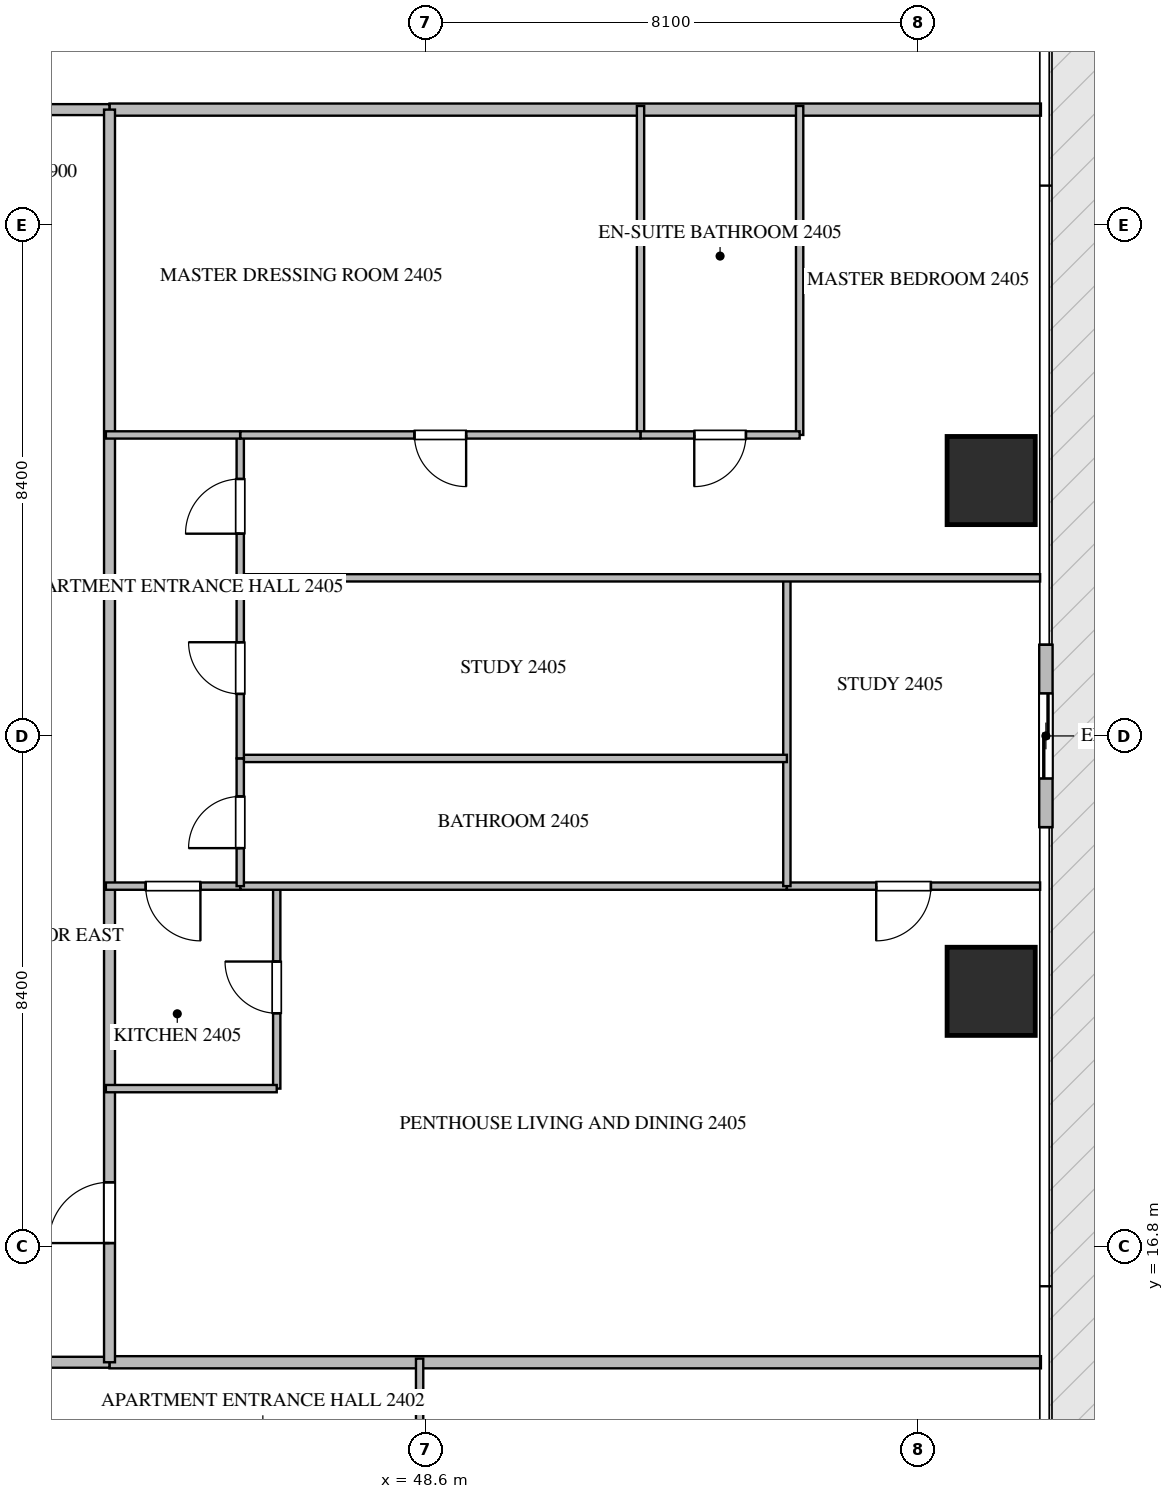
"""IFC4 building model, lengths in metres.
Left out: names, types, materials, properties, quantities, classifications, styles, units other than length and angle.
Written with IfcOpenShell. Run it as: python <this file> out.ifc"""

import sys

from ifc_helpers import new_model, si_unit, direction, frame, frame_2d, origin, origin_2d, place, context, subcontext, project, spatial, rectangle, extrude, source, transform, mapped, element, fill, save


model = new_model("IFC4")
c1 = context("Model", 3, precision=1e-05, world=origin(), true_north=direction((0.0, 1.0)))
c2 = subcontext(c1, "Body", "Model", "MODEL_VIEW")
j1 = project(units=[si_unit("LENGTHUNIT", "METRE"), si_unit("PLANEANGLEUNIT", "RADIAN")], contexts=[c1])
p1 = place(None, origin())
s1 = spatial("IfcSite", under=j1, at=p1, CompositionType="ELEMENT")
p2 = place(p1, origin())
s2 = spatial("IfcBuilding", under=s1, at=p2, CompositionType="ELEMENT")
p3 = place(p2, frame((0.0, 0.0, 97.95)))
s3 = spatial("IfcBuildingStorey", under=s2, at=p3, CompositionType="ELEMENT", Elevation=97.95)
m1 = source(origin(), c2, "Body", "SweptSolid", [
    extrude(rectangle(XDim=1.45, YDim=1.45, at=origin_2d()), origin(), (0.0, 0.0, 1.0), 3.75),
])
for number, where, z_axis, x_axis in (
    (1, (57.9, 21.0, -0.26), (0.0, 0.0, 1.0), (1.0, 0.0, 0.0)),
    (2, (57.9, 29.4, -0.26), (0.0, 0.0, 1.0), (1.0, 0.0, 0.0)),
):
    element("IfcColumn", number, at=place(p3, frame(where, z_axis=z_axis, x_axis=x_axis)), inside=s3, PredefinedType="COLUMN", context=c2, shape_type="MappedRepresentation", body=[
        mapped(m1, transform((0.0, 0.0, 0.0), scale=1.0)),
    ])
p4 = place(p3, frame((58.8, 23.7, 0.0), z_axis=(0.0, 0.0, 1.0), x_axis=(0.0, 1.0, 0.0)))
e3 = element("IfcWall", 3, at=p4, inside=s3, PredefinedType="ELEMENTEDWALL", context=c2, shape_type="SweptSolid", body=[
    extrude(rectangle(XDim=3.0, YDim=0.22, at=frame_2d((1.5, 0.0))), origin(), (0.0, 0.0, 1.0), 3.475),
])
p5 = place(p4, frame((0.8, 0.0, 0.0)))
e4 = element("IfcOpeningElement", 4, at=p5, cuts=e3, PredefinedType="OPENING", context=c2, shape_type="SweptSolid", body=[
    extrude(rectangle(XDim=1.4, YDim=2.25, at=frame_2d((0.7, 1.125))), frame((0.0, 0.12, 0.0), z_axis=(0.0, -1.0, 0.0), x_axis=(1.0, 0.0, 0.0)), (0.0, 0.0, 1.0), 0.24),
])
for number, where, z_axis, x_axis in (
    (5, (43.4, 14.9, 0.0), (0.0, 0.0, 1.0), (1.0, 0.0, 0.0)),
    (6, (43.4, 35.5, 0.0), (0.0, 0.0, 1.0), (1.0, 0.0, 0.0)),
):
    element("IfcWall", number, at=place(p3, frame(where, z_axis=z_axis, x_axis=x_axis)), inside=s3, PredefinedType="PARTITIONING", context=c2, shape_type="SweptSolid", body=[
        extrude(rectangle(XDim=15.318, YDim=0.2, at=frame_2d((7.659, 0.0))), origin(), (0.0, 0.0, 1.0), 3.49),
    ])
p6 = place(p3, frame((21.402, 14.9, 0.0), z_axis=(0.0, 0.0, 1.0), x_axis=(1.0, 0.0, 0.0)))
e7 = element("IfcWall", 7, at=p6, inside=s3, PredefinedType="PARTITIONING", context=c2, shape_type="SweptSolid", body=[
    extrude(rectangle(XDim=21.996, YDim=0.18, at=frame_2d((10.998, 0.0))), origin(), (0.0, 0.0, 1.0), 3.49),
])
p7 = place(p6, frame((7.454, 0.0, 0.0)))
e8 = element("IfcOpeningElement", 8, at=p7, cuts=e7, PredefinedType="OPENING", context=c2, shape_type="SweptSolid", body=[
    extrude(rectangle(XDim=1.0, YDim=2.15, at=frame_2d((0.5, 1.075))), frame((0.0, 0.1, 0.0), z_axis=(0.0, -1.0, 0.0), x_axis=(1.0, 0.0, 0.0)), (0.0, 0.0, 1.0), 0.2),
])
p8 = place(p6, frame((13.542, 0.0, 0.0)))
e9 = element("IfcOpeningElement", 9, at=p8, cuts=e7, PredefinedType="OPENING", context=c2, shape_type="SweptSolid", body=[
    extrude(rectangle(XDim=1.0, YDim=2.15, at=frame_2d((0.5, 1.075))), frame((0.0, 0.1, 0.0), z_axis=(0.0, -1.0, 0.0), x_axis=(1.0, 0.0, 0.0)), (0.0, 0.0, 1.0), 0.2),
])
p9 = place(p3, frame((21.402, 35.5, 0.0), z_axis=(0.0, 0.0, 1.0), x_axis=(1.0, 0.0, 0.0)))
e10 = element("IfcWall", 10, at=p9, inside=s3, PredefinedType="PARTITIONING", context=c2, shape_type="SweptSolid", body=[
    extrude(rectangle(XDim=21.996, YDim=0.18, at=frame_2d((10.998, 0.0))), origin(), (0.0, 0.0, 1.0), 3.49),
])
p10 = place(p9, frame((7.202, 0.0, 0.0)))
e11 = element("IfcOpeningElement", 11, at=p10, cuts=e10, PredefinedType="OPENING", context=c2, shape_type="SweptSolid", body=[
    extrude(rectangle(XDim=1.0, YDim=2.15, at=frame_2d((0.5, 1.075))), frame((0.0, 0.1, 0.0), z_axis=(0.0, -1.0, 0.0), x_axis=(1.0, 0.0, 0.0)), (0.0, 0.0, 1.0), 0.2),
])
p11 = place(p3, frame((43.4, 14.9, 0.0), z_axis=(0.0, 0.0, 1.0), x_axis=(0.0, 1.0, 0.0)))
e12 = element("IfcWall", 12, at=p11, inside=s3, PredefinedType="PARTITIONING", context=c2, shape_type="SweptSolid", body=[
    extrude(rectangle(XDim=20.6, YDim=0.18, at=frame_2d((10.3, 0.0))), origin(), (0.0, 0.0, 1.0), 3.49),
])
p12 = place(p11, frame((1.96, 0.0, 0.0)))
e13 = element("IfcOpeningElement", 13, at=p12, cuts=e12, PredefinedType="OPENING", context=c2, shape_type="SweptSolid", body=[
    extrude(rectangle(XDim=1.0, YDim=2.15, at=frame_2d((0.5, 1.075))), frame((0.0, 0.1, 0.0), z_axis=(0.0, -1.0, 0.0), x_axis=(1.0, 0.0, 0.0)), (0.0, 0.0, 1.0), 0.2),
])
p13 = place(p3, frame((48.5, 12.752, 0.0), z_axis=(0.0, 0.0, 1.0), x_axis=(0.0, 1.0, 0.0)))
e14 = element("IfcWall", 14, at=p13, inside=s3, PredefinedType="PARTITIONING", context=c2, shape_type="SweptSolid", body=[
    extrude(rectangle(XDim=2.208, YDim=0.12, at=frame_2d((1.104, 0.0))), origin(), (0.0, 0.0, 1.0), 3.49),
])
p14 = place(p3, frame((46.15, 19.4, 0.0), z_axis=(0.0, 0.0, 1.0), x_axis=(0.0, 1.0, 0.0)))
e15 = element("IfcWall", 15, at=p14, inside=s3, PredefinedType="PARTITIONING", context=c2, shape_type="SweptSolid", body=[
    extrude(rectangle(XDim=3.33, YDim=0.12, at=frame_2d((1.665, 0.0))), origin(), (0.0, 0.0, 1.0), 3.49),
])
p15 = place(p14, frame((1.24, 0.0, 0.0)))
e16 = element("IfcOpeningElement", 16, at=p15, cuts=e15, PredefinedType="OPENING", context=c2, shape_type="SweptSolid", body=[
    extrude(rectangle(XDim=0.85, YDim=2.1, at=frame_2d((0.425, 1.05))), frame((0.0, 0.07, 0.0), z_axis=(0.0, -1.0, 0.0), x_axis=(1.0, 0.0, 0.0)), (0.0, 0.0, 1.0), 0.14),
])
p16 = place(p3, frame((46.15, 19.4, 0.0), z_axis=(0.0, 0.0, 1.0), x_axis=(-1.0, 0.0, 0.0)))
e17 = element("IfcWall", 17, at=p16, inside=s3, PredefinedType="PARTITIONING", context=c2, shape_type="SweptSolid", body=[
    extrude(rectangle(XDim=2.81, YDim=0.12, at=frame_2d((1.405, 0.0))), origin(), (0.0, 0.0, 1.0), 3.49),
])
p17 = place(p3, frame((45.55, 22.73, 0.0), z_axis=(0.0, 0.0, 1.0), x_axis=(-1.0, 0.0, 0.0)))
e18 = element("IfcWall", 18, at=p17, inside=s3, PredefinedType="PARTITIONING", context=c2, shape_type="SweptSolid", body=[
    extrude(rectangle(XDim=2.21, YDim=0.12, at=frame_2d((1.105, 0.0))), origin(), (0.0, 0.0, 1.0), 3.49),
])
p18 = place(p17, frame((0.655, 0.0, 0.0)))
e19 = element("IfcOpeningElement", 19, at=p18, cuts=e18, PredefinedType="OPENING", context=c2, shape_type="SweptSolid", body=[
    extrude(rectangle(XDim=0.9, YDim=2.1, at=frame_2d((0.45, 1.05))), frame((0.0, 0.07, 0.0), z_axis=(0.0, -1.0, 0.0), x_axis=(1.0, 0.0, 0.0)), (0.0, 0.0, 1.0), 0.14),
])
p19 = place(p3, frame((58.705, 22.73, 0.0), z_axis=(0.0, 0.0, 1.0), x_axis=(-1.0, 0.0, 0.0)))
e20 = element("IfcWall", 20, at=p19, inside=s3, PredefinedType="PARTITIONING", context=c2, shape_type="SweptSolid", body=[
    extrude(rectangle(XDim=4.165, YDim=0.12, at=frame_2d((2.083, 0.0))), origin(), (0.0, 0.0, 1.0), 3.49),
])
p20 = place(p19, frame((1.796, 0.0, 0.0)))
e21 = element("IfcOpeningElement", 21, at=p20, cuts=e20, PredefinedType="OPENING", context=c2, shape_type="SweptSolid", body=[
    extrude(rectangle(XDim=0.9, YDim=2.1, at=frame_2d((0.45, 1.05))), frame((0.0, 0.07, 0.0), z_axis=(0.0, -1.0, 0.0), x_axis=(1.0, 0.0, 0.0)), (0.0, 0.0, 1.0), 0.14),
])
p21 = place(p3, frame((54.538, 22.73, 0.0), z_axis=(0.0, 0.0, 1.0), x_axis=(-1.0, 0.0, 0.0)))
e22 = element("IfcWall", 22, at=p21, inside=s3, PredefinedType="PARTITIONING", context=c2, shape_type="SweptSolid", body=[
    extrude(rectangle(XDim=8.986, YDim=0.12, at=frame_2d((4.493, 0.0))), origin(), (0.0, 0.0, 1.0), 3.49),
])
p22 = place(p3, frame((54.54, 22.73, 0.0), z_axis=(0.0, 0.0, 1.0), x_axis=(0.0, 1.0, 0.0)))
e23 = element("IfcWall", 23, at=p22, inside=s3, PredefinedType="PARTITIONING", context=c2, shape_type="SweptSolid", body=[
    extrude(rectangle(XDim=5.07, YDim=0.12, at=frame_2d((2.535, 0.0))), origin(), (0.0, 0.0, 1.0), 3.49),
])
p23 = place(p3, frame((58.705, 27.8, 0.0), z_axis=(0.0, 0.0, 1.0), x_axis=(-1.0, 0.0, 0.0)))
e24 = element("IfcWall", 24, at=p23, inside=s3, PredefinedType="PARTITIONING", context=c2, shape_type="SweptSolid", body=[
    extrude(rectangle(XDim=13.155, YDim=0.12, at=frame_2d((6.578, 0.0))), origin(), (0.0, 0.0, 1.0), 3.49),
])
p24 = place(p3, frame((54.54, 24.83, 0.0), z_axis=(0.0, 0.0, 1.0), x_axis=(-1.0, 0.0, 0.0)))
e25 = element("IfcWall", 25, at=p24, inside=s3, PredefinedType="PARTITIONING", context=c2, shape_type="SweptSolid", body=[
    extrude(rectangle(XDim=8.99, YDim=0.12, at=frame_2d((4.495, 0.0))), origin(), (0.0, 0.0, 1.0), 3.49),
])
p25 = place(p3, frame((45.55, 22.73, 0.0), z_axis=(0.0, 0.0, 1.0), x_axis=(0.0, 1.0, 0.0)))
e26 = element("IfcWall", 26, at=p25, inside=s3, PredefinedType="PARTITIONING", context=c2, shape_type="SweptSolid", body=[
    extrude(rectangle(XDim=2.1, YDim=0.12, at=frame_2d((1.05, 0.0))), origin(), (0.0, 0.0, 1.0), 3.49),
])
p26 = place(p25, frame((0.625, 0.0, 0.0)))
e27 = element("IfcOpeningElement", 27, at=p26, cuts=e26, PredefinedType="OPENING", context=c2, shape_type="SweptSolid", body=[
    extrude(rectangle(XDim=0.85, YDim=2.1, at=frame_2d((0.425, 1.05))), frame((0.0, 0.07, 0.0), z_axis=(0.0, -1.0, 0.0), x_axis=(1.0, 0.0, 0.0)), (0.0, 0.0, 1.0), 0.14),
])
p27 = place(p3, frame((45.55, 24.832, 0.0), z_axis=(0.0, 0.0, 1.0), x_axis=(0.0, 1.0, 0.0)))
e28 = element("IfcWall", 28, at=p27, inside=s3, PredefinedType="PARTITIONING", context=c2, shape_type="SweptSolid", body=[
    extrude(rectangle(XDim=2.968, YDim=0.12, at=frame_2d((1.484, 0.0))), origin(), (0.0, 0.0, 1.0), 3.49),
])
p28 = place(p27, frame((1.059, 0.0, 0.0)))
e29 = element("IfcOpeningElement", 29, at=p28, cuts=e28, PredefinedType="OPENING", context=c2, shape_type="SweptSolid", body=[
    extrude(rectangle(XDim=0.85, YDim=2.1, at=frame_2d((0.425, 1.05))), frame((0.0, 0.07, 0.0), z_axis=(0.0, -1.0, 0.0), x_axis=(1.0, 0.0, 0.0)), (0.0, 0.0, 1.0), 0.14),
])
p29 = place(p3, frame((45.55, 27.802, 0.0), z_axis=(0.0, 0.0, 1.0), x_axis=(0.0, 1.0, 0.0)))
e30 = element("IfcWall", 30, at=p29, inside=s3, PredefinedType="PARTITIONING", context=c2, shape_type="SweptSolid", body=[
    extrude(rectangle(XDim=2.348, YDim=0.12, at=frame_2d((1.174, 0.0))), origin(), (0.0, 0.0, 1.0), 3.49),
])
p30 = place(p29, frame((0.724, 0.0, 0.0)))
e31 = element("IfcOpeningElement", 31, at=p30, cuts=e30, PredefinedType="OPENING", context=c2, shape_type="SweptSolid", body=[
    extrude(rectangle(XDim=0.9, YDim=2.1, at=frame_2d((0.45, 1.05))), frame((0.0, 0.07, 0.0), z_axis=(0.0, -1.0, 0.0), x_axis=(1.0, 0.0, 0.0)), (0.0, 0.0, 1.0), 0.14),
])
for number, where, z_axis, x_axis in (
    (32, (54.75, 30.15, 0.0), (0.0, 0.0, 1.0), (0.0, 1.0, 0.0)),
    (33, (52.133, 30.15, 0.0), (0.0, 0.0, 1.0), (0.0, 1.0, 0.0)),
):
    element("IfcWall", number, at=place(p3, frame(where, z_axis=z_axis, x_axis=x_axis)), inside=s3, PredefinedType="PARTITIONING", context=c2, shape_type="SweptSolid", body=[
        extrude(rectangle(XDim=5.41, YDim=0.12, at=frame_2d((2.705, 0.0))), origin(), (0.0, 0.0, 1.0), 3.49),
    ])
p31 = place(p3, frame((54.75, 30.15, 0.0), z_axis=(0.0, 0.0, 1.0), x_axis=(-1.0, 0.0, 0.0)))
e34 = element("IfcWall", 34, at=p31, inside=s3, PredefinedType="PARTITIONING", context=c2, shape_type="SweptSolid", body=[
    extrude(rectangle(XDim=2.617, YDim=0.12, at=frame_2d((1.309, 0.0))), origin(), (0.0, 0.0, 1.0), 3.49),
])
p32 = place(p31, frame((0.883, 0.0, 0.0)))
e35 = element("IfcOpeningElement", 35, at=p32, cuts=e34, PredefinedType="OPENING", context=c2, shape_type="SweptSolid", body=[
    extrude(rectangle(XDim=0.85, YDim=2.1, at=frame_2d((0.425, 1.05))), frame((0.0, 0.07, 0.0), z_axis=(0.0, -1.0, 0.0), x_axis=(1.0, 0.0, 0.0)), (0.0, 0.0, 1.0), 0.14),
])
p33 = place(p3, frame((52.131, 30.15, 0.0), z_axis=(0.0, 0.0, 1.0), x_axis=(-1.0, 0.0, 0.0)))
e36 = element("IfcWall", 36, at=p33, inside=s3, PredefinedType="PARTITIONING", context=c2, shape_type="SweptSolid", body=[
    extrude(rectangle(XDim=6.581, YDim=0.12, at=frame_2d((3.291, 0.0))), origin(), (0.0, 0.0, 1.0), 3.49),
])
p34 = place(p33, frame((2.866, 0.0, 0.0)))
e37 = element("IfcOpeningElement", 37, at=p34, cuts=e36, PredefinedType="OPENING", context=c2, shape_type="SweptSolid", body=[
    extrude(rectangle(XDim=0.85, YDim=2.1, at=frame_2d((0.425, 1.05))), frame((0.0, 0.07, 0.0), z_axis=(0.0, -1.0, 0.0), x_axis=(1.0, 0.0, 0.0)), (0.0, 0.0, 1.0), 0.14),
])
p35 = place(p3, frame((45.548, 30.15, 0.0), z_axis=(0.0, 0.0, 1.0), x_axis=(-1.0, 0.0, 0.0)))
e38 = element("IfcWall", 38, at=p35, inside=s3, PredefinedType="PARTITIONING", context=c2, shape_type="SweptSolid", body=[
    extrude(rectangle(XDim=2.208, YDim=0.12, at=frame_2d((1.104, 0.0))), origin(), (0.0, 0.0, 1.0), 3.49),
])
m2 = source(origin(), c2, "Body", "SweptSolid", [
    extrude(rectangle(XDim=1.4, YDim=2.25, at=frame_2d((0.7, 1.125))), frame((0.0, 0.025, 0.0), z_axis=(0.0, -1.0, 0.0), x_axis=(1.0, 0.0, 0.0)), (0.0, 0.0, 1.0), 0.05),
])
p36 = place(p5, origin())
e39 = element("IfcDoor", 39, at=p36, inside=s3, OperationType="SLIDING_TO_LEFT", PredefinedType="DOOR", context=c2, shape_type="MappedRepresentation", body=[
    mapped(m2, transform((0.0, 0.0, 0.0), scale=1.0)),
])
fill(e4, e39)
m3 = source(origin(), c2, "Body", "SweptSolid", [
    extrude(rectangle(XDim=1.0, YDim=2.15, at=frame_2d((0.5, 1.075))), frame((0.0, 0.025, 0.0), z_axis=(0.0, -1.0, 0.0), x_axis=(1.0, 0.0, 0.0)), (0.0, 0.0, 1.0), 0.05),
])
p37 = place(p12, origin())
e40 = element("IfcDoor", 40, at=p37, inside=s3, OperationType="SINGLE_SWING_LEFT", PredefinedType="DOOR", context=c2, shape_type="MappedRepresentation", body=[
    mapped(m3, transform((0.0, 0.0, 0.0), scale=1.0)),
])
fill(e13, e40)
m4 = source(origin(), c2, "Body", "SweptSolid", [
    extrude(rectangle(XDim=0.85, YDim=2.1, at=frame_2d((0.425, 1.05))), frame((0.0, 0.025, 0.0), z_axis=(0.0, -1.0, 0.0), x_axis=(1.0, 0.0, 0.0)), (0.0, 0.0, 1.0), 0.05),
])
p38 = place(p15, origin())
e41 = element("IfcDoor", 41, at=p38, inside=s3, OperationType="SINGLE_SWING_RIGHT", PredefinedType="DOOR", context=c2, shape_type="MappedRepresentation", body=[
    mapped(m4, transform((0.0, 0.0, 0.0), scale=1.0)),
])
fill(e16, e41)
m5 = source(origin(), c2, "Body", "SweptSolid", [
    extrude(rectangle(XDim=0.9, YDim=2.1, at=frame_2d((0.45, 1.05))), frame((0.0, 0.025, 0.0), z_axis=(0.0, -1.0, 0.0), x_axis=(1.0, 0.0, 0.0)), (0.0, 0.0, 1.0), 0.05),
])
p39 = place(p18, origin())
e42 = element("IfcDoor", 42, at=p39, inside=s3, OperationType="SINGLE_SWING_LEFT", PredefinedType="DOOR", context=c2, shape_type="MappedRepresentation", body=[
    mapped(m5, transform((0.0, 0.0, 0.0), scale=1.0)),
])
fill(e19, e42)
p40 = place(p20, origin())
e43 = element("IfcDoor", 43, at=p40, inside=s3, OperationType="SINGLE_SWING_RIGHT", PredefinedType="DOOR", context=c2, shape_type="MappedRepresentation", body=[
    mapped(m5, transform((0.0, 0.0, 0.0), scale=1.0)),
])
fill(e21, e43)
p41 = place(p26, origin())
e44 = element("IfcDoor", 44, at=p41, inside=s3, OperationType="SINGLE_SWING_LEFT", PredefinedType="DOOR", context=c2, shape_type="MappedRepresentation", body=[
    mapped(m4, transform((0.0, 0.0, 0.0), scale=1.0)),
])
fill(e27, e44)
p42 = place(p28, origin())
e45 = element("IfcDoor", 45, at=p42, inside=s3, OperationType="SINGLE_SWING_RIGHT", PredefinedType="DOOR", context=c2, shape_type="MappedRepresentation", body=[
    mapped(m4, transform((0.0, 0.0, 0.0), scale=1.0)),
])
fill(e29, e45)
p43 = place(p30, origin())
e46 = element("IfcDoor", 46, at=p43, inside=s3, OperationType="SINGLE_SWING_LEFT", PredefinedType="DOOR", context=c2, shape_type="MappedRepresentation", body=[
    mapped(m5, transform((0.0, 0.0, 0.0), scale=1.0)),
])
fill(e31, e46)
p44 = place(p32, origin())
e47 = element("IfcDoor", 47, at=p44, inside=s3, OperationType="SINGLE_SWING_RIGHT", PredefinedType="DOOR", context=c2, shape_type="MappedRepresentation", body=[
    mapped(m4, transform((0.0, 0.0, 0.0), scale=1.0)),
])
fill(e35, e47)
p45 = place(p34, origin())
e48 = element("IfcDoor", 48, at=p45, inside=s3, OperationType="SINGLE_SWING_LEFT", PredefinedType="DOOR", context=c2, shape_type="MappedRepresentation", body=[
    mapped(m4, transform((0.0, 0.0, 0.0), scale=1.0)),
])
fill(e37, e48)
save(model, sys.argv[1])
